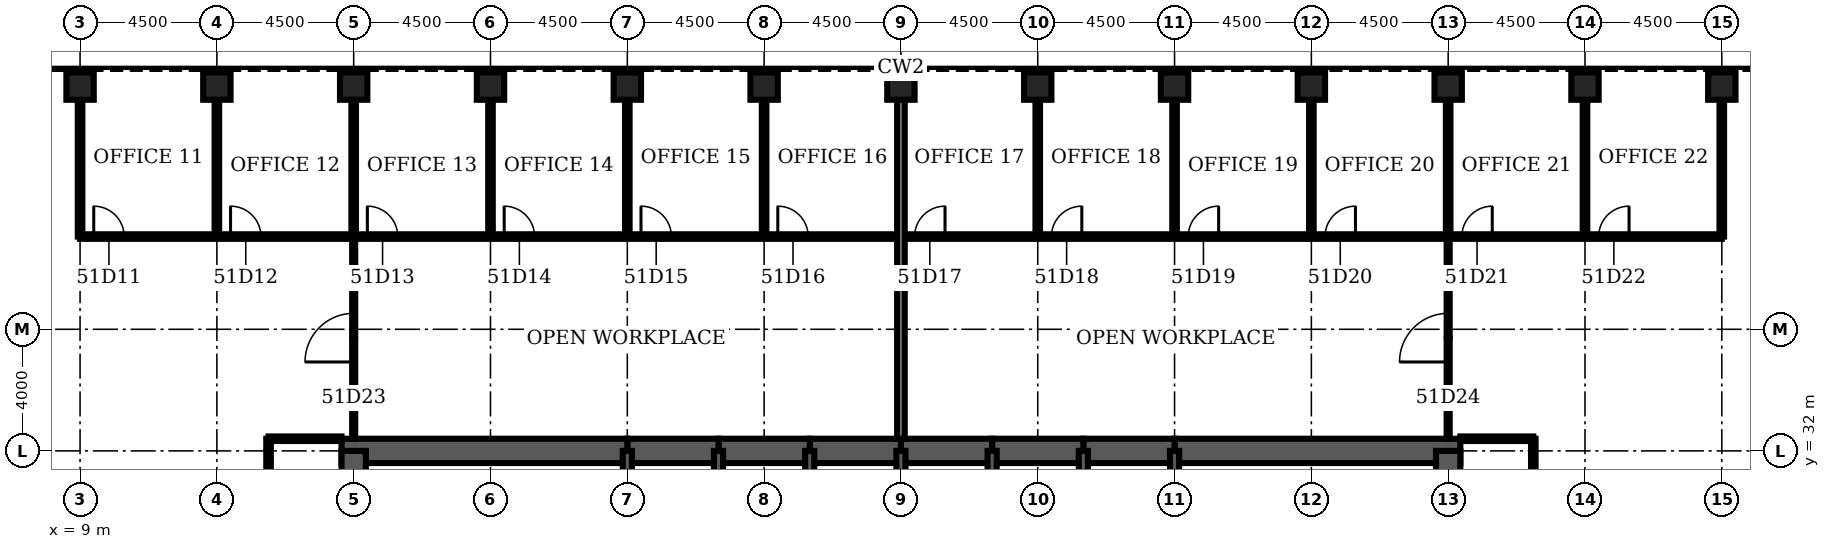
"""IFC4 building model, lengths in metres.
Left out: names, types, materials, properties, quantities, classifications, styles, units other than length and angle.
Written with IfcOpenShell. Run it as: python <this file> out.ifc"""

import sys

from ifc_helpers import new_model, si_unit, direction, frame, frame_2d, origin, origin_2d, place, context, subcontext, project, spatial, rectangle, hollow_rectangle, extrude, element, fill, save


model = new_model("IFC4")
c1 = context("Model", 3, precision=1e-05, world=origin(), true_north=direction((0.0, 1.0)))
c2 = subcontext(c1, "Body", "Model", "MODEL_VIEW")
j1 = project(units=[si_unit("LENGTHUNIT", "METRE"), si_unit("PLANEANGLEUNIT", "RADIAN")], contexts=[c1])
p1 = place(None, origin())
s1 = spatial("IfcSite", under=j1, at=p1, CompositionType="ELEMENT")
p2 = place(p1, origin())
s2 = spatial("IfcBuilding", under=s1, at=p2, CompositionType="ELEMENT")
p3 = place(p2, frame((0.0, 0.0, 227.8)))
s3 = spatial("IfcBuildingStorey", under=s2, at=p3, CompositionType="ELEMENT", Elevation=227.8)
for number, where, z_axis, x_axis in (
    (1, (63.0, 44.0, 0.0), (0.0, 0.0, 1.0), (0.0, 1.0, 0.0)),
    (2, (58.5, 44.0, 0.0), (0.0, 0.0, 1.0), (0.0, 1.0, 0.0)),
    (3, (54.0, 44.0, 0.0), (0.0, 0.0, 1.0), (0.0, 1.0, 0.0)),
    (4, (49.5, 44.0, 0.0), (0.0, 0.0, 1.0), (0.0, 1.0, 0.0)),
    (5, (45.0, 44.0, 0.0), (0.0, 0.0, 1.0), (0.0, 1.0, 0.0)),
    (6, (40.5, 44.0, 0.0), (0.0, 0.0, 1.0), (0.0, 1.0, 0.0)),
    (7, (36.0, 44.0, 0.0), (0.0, 0.0, 1.0), (0.0, 1.0, 0.0)),
    (8, (31.5, 44.0, 0.0), (0.0, 0.0, 1.0), (0.0, 1.0, 0.0)),
    (9, (27.0, 44.0, 0.0), (0.0, 0.0, 1.0), (0.0, 1.0, 0.0)),
    (10, (22.5, 44.0, 0.0), (0.0, 0.0, 1.0), (0.0, 1.0, 0.0)),
    (11, (18.0, 44.0, 0.0), (0.0, 0.0, 1.0), (0.0, 1.0, 0.0)),
    (12, (13.5, 44.0, 0.0), (0.0, 0.0, 1.0), (0.0, 1.0, 0.0)),
    (13, (9.0, 44.0, 0.0), (0.0, 0.0, 1.0), (0.0, 1.0, 0.0)),
):
    element("IfcColumn", number, at=place(p3, frame(where, z_axis=z_axis, x_axis=x_axis)), inside=s3, PredefinedType="COLUMN", context=c2, shape_type="SweptSolid", body=[
        extrude(hollow_rectangle(XDim=0.9, YDim=0.9, WallThickness=0.08, at=origin_2d()), origin(), (0.0, 0.0, 1.0), 4.2),
    ])
p4 = place(p3, frame((54.4, 32.0, 0.0), z_axis=(0.0, 0.0, 1.0), x_axis=(-1.0, 0.0, 0.0)))
e14 = element("IfcWall", 14, at=p4, inside=s3, PredefinedType="SHEAR", context=c2, shape_type="SweptSolid", body=[
    extrude(rectangle(XDim=9.4, YDim=0.8, at=frame_2d((4.7, 0.0))), origin(), (0.0, 0.0, 1.0), 4.2),
])
for number, where, z_axis, x_axis in (
    (15, (45.0, 32.0, 0.0), (0.0, 0.0, 1.0), (-1.0, 0.0, 0.0)),
    (16, (42.0, 32.0, 0.0), (0.0, 0.0, 1.0), (-1.0, 0.0, 0.0)),
    (17, (39.0, 32.0, 0.0), (0.0, 0.0, 1.0), (-1.0, 0.0, 0.0)),
    (18, (36.0, 32.0, 0.0), (0.0, 0.0, 1.0), (-1.0, 0.0, 0.0)),
    (19, (33.0, 32.0, 0.0), (0.0, 0.0, 1.0), (-1.0, 0.0, 0.0)),
    (20, (30.0, 32.0, 0.0), (0.0, 0.0, 1.0), (-1.0, 0.0, 0.0)),
):
    element("IfcWall", number, at=place(p3, frame(where, z_axis=z_axis, x_axis=x_axis)), inside=s3, PredefinedType="SHEAR", context=c2, shape_type="SweptSolid", body=[
        extrude(rectangle(XDim=3.0, YDim=0.8, at=frame_2d((1.5, 0.0))), origin(), (0.0, 0.0, 1.0), 4.2),
    ])
p5 = place(p3, frame((27.0, 32.0, 0.0), z_axis=(0.0, 0.0, 1.0), x_axis=(-1.0, 0.0, 0.0)))
e21 = element("IfcWall", 21, at=p5, inside=s3, PredefinedType="SHEAR", context=c2, shape_type="SweptSolid", body=[
    extrude(rectangle(XDim=9.4, YDim=0.8, at=frame_2d((4.7, 0.0))), origin(), (0.0, 0.0, 1.0), 4.2),
])
for number, where, z_axis, x_axis in (
    (22, (18.0, 32.0, 0.0), (0.0, 0.0, 1.0), (0.0, -1.0, 0.0)),
    (23, (54.0, 28.8, 0.0), (0.0, 0.0, 1.0), (0.0, 1.0, 0.0)),
):
    element("IfcWall", number, at=place(p3, frame(where, z_axis=z_axis, x_axis=x_axis)), inside=s3, PredefinedType="SHEAR", context=c2, shape_type="SweptSolid", body=[
        extrude(rectangle(XDim=3.2, YDim=0.8, at=frame_2d((1.6, 0.0))), origin(), (0.0, 0.0, 1.0), 4.2),
    ])
for number, where, z_axis, x_axis in (
    (24, (27.0, 28.8, 0.0), (0.0, 0.0, 1.0), (0.0, 1.0, 0.0)),
    (25, (30.0, 28.8, 0.0), (0.0, 0.0, 1.0), (0.0, 1.0, 0.0)),
    (26, (33.0, 28.8, 0.0), (0.0, 0.0, 1.0), (0.0, 1.0, 0.0)),
    (27, (36.0, 28.8, 0.0), (0.0, 0.0, 1.0), (0.0, 1.0, 0.0)),
    (28, (39.0, 28.8, 0.0), (0.0, 0.0, 1.0), (0.0, 1.0, 0.0)),
    (29, (42.0, 28.8, 0.0), (0.0, 0.0, 1.0), (0.0, 1.0, 0.0)),
    (30, (45.0, 28.8, 0.0), (0.0, 0.0, 1.0), (0.0, 1.0, 0.0)),
):
    element("IfcWall", number, at=place(p3, frame(where, z_axis=z_axis, x_axis=x_axis)), inside=s3, PredefinedType="SOLIDWALL", context=c2, shape_type="SweptSolid", body=[
        extrude(rectangle(XDim=3.2, YDim=0.3, at=frame_2d((1.6, 0.0))), origin(), (0.0, 0.0, 1.0), 4.2),
    ])
for number, where, z_axis, x_axis in (
    (31, (15.2, 32.4, 0.0), (0.0, 0.0, 1.0), (1.0, 0.0, 0.0)),
    (32, (54.4, 32.4, 0.0), (0.0, 0.0, 1.0), (1.0, 0.0, 0.0)),
):
    element("IfcWall", number, at=place(p3, frame(where, z_axis=z_axis, x_axis=x_axis)), inside=s3, PredefinedType="PARTITIONING", context=c2, shape_type="SweptSolid", body=[
        extrude(rectangle(XDim=2.4, YDim=0.15, at=frame_2d((1.2, 0.0))), origin(), (0.0, 0.0, 1.0), 3.0),
    ])
p6 = place(p3, frame((9.0, 39.05, 0.0), z_axis=(0.0, 0.0, 1.0), x_axis=(1.0, 0.0, 0.0)))
e33 = element("IfcWall", 33, at=p6, inside=s3, PredefinedType="PARTITIONING", context=c2, shape_type="SweptSolid", body=[
    extrude(rectangle(XDim=54.0, YDim=0.15, at=frame_2d((27.0, 0.0))), origin(), (0.0, 0.0, 1.0), 3.0),
])
p7 = place(p6, frame((0.45, 0.0, 0.0)))
e34 = element("IfcOpeningElement", 34, at=p7, cuts=e33, PredefinedType="OPENING", context=c2, shape_type="SweptSolid", body=[
    extrude(rectangle(XDim=1.0, YDim=2.1, at=frame_2d((0.5, 1.05))), frame((0.0, 0.085, 0.0), z_axis=(0.0, -1.0, 0.0), x_axis=(1.0, 0.0, 0.0)), (0.0, 0.0, 1.0), 0.17),
])
p8 = place(p6, frame((4.95, 0.0, 0.0)))
e35 = element("IfcOpeningElement", 35, at=p8, cuts=e33, PredefinedType="OPENING", context=c2, shape_type="SweptSolid", body=[
    extrude(rectangle(XDim=1.0, YDim=2.1, at=frame_2d((0.5, 1.05))), frame((0.0, 0.085, 0.0), z_axis=(0.0, -1.0, 0.0), x_axis=(1.0, 0.0, 0.0)), (0.0, 0.0, 1.0), 0.17),
])
p9 = place(p6, frame((9.45, 0.0, 0.0)))
e36 = element("IfcOpeningElement", 36, at=p9, cuts=e33, PredefinedType="OPENING", context=c2, shape_type="SweptSolid", body=[
    extrude(rectangle(XDim=1.0, YDim=2.1, at=frame_2d((0.5, 1.05))), frame((0.0, 0.085, 0.0), z_axis=(0.0, -1.0, 0.0), x_axis=(1.0, 0.0, 0.0)), (0.0, 0.0, 1.0), 0.17),
])
p10 = place(p6, frame((13.95, 0.0, 0.0)))
e37 = element("IfcOpeningElement", 37, at=p10, cuts=e33, PredefinedType="OPENING", context=c2, shape_type="SweptSolid", body=[
    extrude(rectangle(XDim=1.0, YDim=2.1, at=frame_2d((0.5, 1.05))), frame((0.0, 0.085, 0.0), z_axis=(0.0, -1.0, 0.0), x_axis=(1.0, 0.0, 0.0)), (0.0, 0.0, 1.0), 0.17),
])
p11 = place(p6, frame((18.45, 0.0, 0.0)))
e38 = element("IfcOpeningElement", 38, at=p11, cuts=e33, PredefinedType="OPENING", context=c2, shape_type="SweptSolid", body=[
    extrude(rectangle(XDim=1.0, YDim=2.1, at=frame_2d((0.5, 1.05))), frame((0.0, 0.085, 0.0), z_axis=(0.0, -1.0, 0.0), x_axis=(1.0, 0.0, 0.0)), (0.0, 0.0, 1.0), 0.17),
])
p12 = place(p6, frame((22.95, 0.0, 0.0)))
e39 = element("IfcOpeningElement", 39, at=p12, cuts=e33, PredefinedType="OPENING", context=c2, shape_type="SweptSolid", body=[
    extrude(rectangle(XDim=1.0, YDim=2.1, at=frame_2d((0.5, 1.05))), frame((0.0, 0.085, 0.0), z_axis=(0.0, -1.0, 0.0), x_axis=(1.0, 0.0, 0.0)), (0.0, 0.0, 1.0), 0.17),
])
p13 = place(p6, frame((27.45, 0.0, 0.0)))
e40 = element("IfcOpeningElement", 40, at=p13, cuts=e33, PredefinedType="OPENING", context=c2, shape_type="SweptSolid", body=[
    extrude(rectangle(XDim=1.0, YDim=2.1, at=frame_2d((0.5, 1.05))), frame((0.0, 0.085, 0.0), z_axis=(0.0, -1.0, 0.0), x_axis=(1.0, 0.0, 0.0)), (0.0, 0.0, 1.0), 0.17),
])
p14 = place(p6, frame((31.95, 0.0, 0.0)))
e41 = element("IfcOpeningElement", 41, at=p14, cuts=e33, PredefinedType="OPENING", context=c2, shape_type="SweptSolid", body=[
    extrude(rectangle(XDim=1.0, YDim=2.1, at=frame_2d((0.5, 1.05))), frame((0.0, 0.085, 0.0), z_axis=(0.0, -1.0, 0.0), x_axis=(1.0, 0.0, 0.0)), (0.0, 0.0, 1.0), 0.17),
])
p15 = place(p6, frame((36.45, 0.0, 0.0)))
e42 = element("IfcOpeningElement", 42, at=p15, cuts=e33, PredefinedType="OPENING", context=c2, shape_type="SweptSolid", body=[
    extrude(rectangle(XDim=1.0, YDim=2.1, at=frame_2d((0.5, 1.05))), frame((0.0, 0.085, 0.0), z_axis=(0.0, -1.0, 0.0), x_axis=(1.0, 0.0, 0.0)), (0.0, 0.0, 1.0), 0.17),
])
p16 = place(p6, frame((40.95, 0.0, 0.0)))
e43 = element("IfcOpeningElement", 43, at=p16, cuts=e33, PredefinedType="OPENING", context=c2, shape_type="SweptSolid", body=[
    extrude(rectangle(XDim=1.0, YDim=2.1, at=frame_2d((0.5, 1.05))), frame((0.0, 0.085, 0.0), z_axis=(0.0, -1.0, 0.0), x_axis=(1.0, 0.0, 0.0)), (0.0, 0.0, 1.0), 0.17),
])
p17 = place(p6, frame((45.45, 0.0, 0.0)))
e44 = element("IfcOpeningElement", 44, at=p17, cuts=e33, PredefinedType="OPENING", context=c2, shape_type="SweptSolid", body=[
    extrude(rectangle(XDim=1.0, YDim=2.1, at=frame_2d((0.5, 1.05))), frame((0.0, 0.085, 0.0), z_axis=(0.0, -1.0, 0.0), x_axis=(1.0, 0.0, 0.0)), (0.0, 0.0, 1.0), 0.17),
])
p18 = place(p6, frame((49.95, 0.0, 0.0)))
e45 = element("IfcOpeningElement", 45, at=p18, cuts=e33, PredefinedType="OPENING", context=c2, shape_type="SweptSolid", body=[
    extrude(rectangle(XDim=1.0, YDim=2.1, at=frame_2d((0.5, 1.05))), frame((0.0, 0.085, 0.0), z_axis=(0.0, -1.0, 0.0), x_axis=(1.0, 0.0, 0.0)), (0.0, 0.0, 1.0), 0.17),
])
for number, where, z_axis, x_axis in (
    (46, (9.0, 39.05, 0.0), (0.0, 0.0, 1.0), (0.0, 1.0, 0.0)),
    (47, (13.5, 39.05, 0.0), (0.0, 0.0, 1.0), (0.0, 1.0, 0.0)),
):
    element("IfcWall", number, at=place(p3, frame(where, z_axis=z_axis, x_axis=x_axis)), inside=s3, PredefinedType="PARTITIONING", context=c2, shape_type="SweptSolid", body=[
        extrude(rectangle(XDim=4.5, YDim=0.15, at=frame_2d((2.25, 0.0))), origin(), (0.0, 0.0, 1.0), 3.0),
    ])
p19 = place(p3, frame((15.2, 13.8, 0.0), z_axis=(0.0, 0.0, 1.0), x_axis=(0.0, 1.0, 0.0)))
e48 = element("IfcWall", 48, at=p19, inside=s3, PredefinedType="PARTITIONING", context=c2, shape_type="SweptSolid", body=[
    extrude(rectangle(XDim=18.6, YDim=0.15, at=frame_2d((9.3, 0.0))), origin(), (0.0, 0.0, 1.0), 3.0),
])
p20 = place(p19, frame((9.6, 0.0, 0.0)))
e49 = element("IfcOpeningElement", 49, at=p20, cuts=e48, PredefinedType="OPENING", context=c2, shape_type="SweptSolid", body=[
    extrude(rectangle(XDim=1.2, YDim=2.1, at=frame_2d((0.6, 1.05))), frame((0.0, 0.085, 0.0), z_axis=(0.0, -1.0, 0.0), x_axis=(1.0, 0.0, 0.0)), (0.0, 0.0, 1.0), 0.17),
])
p21 = place(p3, frame((18.0, 32.4, 0.0), z_axis=(0.0, 0.0, 1.0), x_axis=(0.0, 1.0, 0.0)))
e50 = element("IfcWall", 50, at=p21, inside=s3, PredefinedType="PARTITIONING", context=c2, shape_type="SweptSolid", body=[
    extrude(rectangle(XDim=6.65, YDim=0.1, at=frame_2d((3.325, 0.0))), origin(), (0.0, 0.0, 1.0), 3.0),
])
p22 = place(p21, frame((2.525, 0.0, 0.0)))
e51 = element("IfcOpeningElement", 51, at=p22, cuts=e50, PredefinedType="OPENING", context=c2, shape_type="SweptSolid", body=[
    extrude(rectangle(XDim=1.6, YDim=2.1, at=frame_2d((0.8, 1.05))), frame((0.0, 0.06, 0.0), z_axis=(0.0, -1.0, 0.0), x_axis=(1.0, 0.0, 0.0)), (0.0, 0.0, 1.0), 0.12),
])
for number, where, z_axis, x_axis in (
    (52, (18.0, 39.05, 0.0), (0.0, 0.0, 1.0), (0.0, 1.0, 0.0)),
    (53, (22.5, 39.05, 0.0), (0.0, 0.0, 1.0), (0.0, 1.0, 0.0)),
    (54, (27.0, 39.05, 0.0), (0.0, 0.0, 1.0), (0.0, 1.0, 0.0)),
    (55, (31.5, 39.05, 0.0), (0.0, 0.0, 1.0), (0.0, 1.0, 0.0)),
):
    element("IfcWall", number, at=place(p3, frame(where, z_axis=z_axis, x_axis=x_axis)), inside=s3, PredefinedType="PARTITIONING", context=c2, shape_type="SweptSolid", body=[
        extrude(rectangle(XDim=4.5, YDim=0.15, at=frame_2d((2.25, 0.0))), origin(), (0.0, 0.0, 1.0), 3.0),
    ])
p23 = place(p3, frame((36.0, 32.4, 0.0), z_axis=(0.0, 0.0, 1.0), x_axis=(0.0, 1.0, 0.0)))
e56 = element("IfcWall", 56, at=p23, inside=s3, PredefinedType="PARTITIONING", context=c2, shape_type="SweptSolid", body=[
    extrude(rectangle(XDim=11.15, YDim=0.25, at=frame_2d((5.575, 0.0))), origin(), (0.0, 0.0, 1.0), 3.0),
])
for number, where, z_axis, x_axis in (
    (57, (40.5, 39.05, 0.0), (0.0, 0.0, 1.0), (0.0, 1.0, 0.0)),
    (58, (45.0, 39.05, 0.0), (0.0, 0.0, 1.0), (0.0, 1.0, 0.0)),
    (59, (49.5, 39.05, 0.0), (0.0, 0.0, 1.0), (0.0, 1.0, 0.0)),
):
    element("IfcWall", number, at=place(p3, frame(where, z_axis=z_axis, x_axis=x_axis)), inside=s3, PredefinedType="PARTITIONING", context=c2, shape_type="SweptSolid", body=[
        extrude(rectangle(XDim=4.5, YDim=0.15, at=frame_2d((2.25, 0.0))), origin(), (0.0, 0.0, 1.0), 3.0),
    ])
p24 = place(p3, frame((54.0, 32.4, 0.0), z_axis=(0.0, 0.0, 1.0), x_axis=(0.0, 1.0, 0.0)))
e60 = element("IfcWall", 60, at=p24, inside=s3, PredefinedType="PARTITIONING", context=c2, shape_type="SweptSolid", body=[
    extrude(rectangle(XDim=6.65, YDim=0.1, at=frame_2d((3.325, 0.0))), origin(), (0.0, 0.0, 1.0), 3.0),
])
p25 = place(p24, frame((2.525, 0.0, 0.0)))
e61 = element("IfcOpeningElement", 61, at=p25, cuts=e60, PredefinedType="OPENING", context=c2, shape_type="SweptSolid", body=[
    extrude(rectangle(XDim=1.6, YDim=2.1, at=frame_2d((0.8, 1.05))), frame((0.0, 0.06, 0.0), z_axis=(0.0, -1.0, 0.0), x_axis=(1.0, 0.0, 0.0)), (0.0, 0.0, 1.0), 0.12),
])
p26 = place(p3, frame((54.0, 39.05, 0.0), z_axis=(0.0, 0.0, 1.0), x_axis=(0.0, 1.0, 0.0)))
e62 = element("IfcWall", 62, at=p26, inside=s3, PredefinedType="PARTITIONING", context=c2, shape_type="SweptSolid", body=[
    extrude(rectangle(XDim=4.5, YDim=0.15, at=frame_2d((2.25, 0.0))), origin(), (0.0, 0.0, 1.0), 3.0),
])
p27 = place(p3, frame((56.8, 13.8, 0.0), z_axis=(0.0, 0.0, 1.0), x_axis=(0.0, 1.0, 0.0)))
e63 = element("IfcWall", 63, at=p27, inside=s3, PredefinedType="PARTITIONING", context=c2, shape_type="SweptSolid", body=[
    extrude(rectangle(XDim=18.6, YDim=0.15, at=frame_2d((9.3, 0.0))), origin(), (0.0, 0.0, 1.0), 3.0),
])
p28 = place(p27, frame((9.6, 0.0, 0.0)))
e64 = element("IfcOpeningElement", 64, at=p28, cuts=e63, PredefinedType="OPENING", context=c2, shape_type="SweptSolid", body=[
    extrude(rectangle(XDim=1.2, YDim=2.1, at=frame_2d((0.6, 1.05))), frame((0.0, 0.085, 0.0), z_axis=(0.0, -1.0, 0.0), x_axis=(1.0, 0.0, 0.0)), (0.0, 0.0, 1.0), 0.17),
])
for number, where, z_axis, x_axis in (
    (65, (58.5, 39.05, 0.0), (0.0, 0.0, 1.0), (0.0, 1.0, 0.0)),
    (66, (63.0, 39.05, 0.0), (0.0, 0.0, 1.0), (0.0, 1.0, 0.0)),
):
    element("IfcWall", number, at=place(p3, frame(where, z_axis=z_axis, x_axis=x_axis)), inside=s3, PredefinedType="PARTITIONING", context=c2, shape_type="SweptSolid", body=[
        extrude(rectangle(XDim=4.5, YDim=0.15, at=frame_2d((2.25, 0.0))), origin(), (0.0, 0.0, 1.0), 3.0),
    ])
p29 = place(p7, origin())
e67 = element("IfcDoor", 67, at=p29, inside=s3, OperationType="SINGLE_SWING_LEFT", PredefinedType="DOOR", context=c2, shape_type="SweptSolid", body=[
    extrude(rectangle(XDim=1.0, YDim=2.1, at=frame_2d((0.5, 1.05))), frame((0.0, 0.025, 0.0), z_axis=(0.0, -1.0, 0.0), x_axis=(1.0, 0.0, 0.0)), (0.0, 0.0, 1.0), 0.05),
])
fill(e34, e67)
p30 = place(p8, origin())
e68 = element("IfcDoor", 68, at=p30, inside=s3, OperationType="SINGLE_SWING_LEFT", PredefinedType="DOOR", context=c2, shape_type="SweptSolid", body=[
    extrude(rectangle(XDim=1.0, YDim=2.1, at=frame_2d((0.5, 1.05))), frame((0.0, 0.025, 0.0), z_axis=(0.0, -1.0, 0.0), x_axis=(1.0, 0.0, 0.0)), (0.0, 0.0, 1.0), 0.05),
])
fill(e35, e68)
p31 = place(p9, origin())
e69 = element("IfcDoor", 69, at=p31, inside=s3, OperationType="SINGLE_SWING_LEFT", PredefinedType="DOOR", context=c2, shape_type="SweptSolid", body=[
    extrude(rectangle(XDim=1.0, YDim=2.1, at=frame_2d((0.5, 1.05))), frame((0.0, 0.025, 0.0), z_axis=(0.0, -1.0, 0.0), x_axis=(1.0, 0.0, 0.0)), (0.0, 0.0, 1.0), 0.05),
])
fill(e36, e69)
p32 = place(p10, origin())
e70 = element("IfcDoor", 70, at=p32, inside=s3, OperationType="SINGLE_SWING_LEFT", PredefinedType="DOOR", context=c2, shape_type="SweptSolid", body=[
    extrude(rectangle(XDim=1.0, YDim=2.1, at=frame_2d((0.5, 1.05))), frame((0.0, 0.025, 0.0), z_axis=(0.0, -1.0, 0.0), x_axis=(1.0, 0.0, 0.0)), (0.0, 0.0, 1.0), 0.05),
])
fill(e37, e70)
p33 = place(p11, origin())
e71 = element("IfcDoor", 71, at=p33, inside=s3, OperationType="SINGLE_SWING_LEFT", PredefinedType="DOOR", context=c2, shape_type="SweptSolid", body=[
    extrude(rectangle(XDim=1.0, YDim=2.1, at=frame_2d((0.5, 1.05))), frame((0.0, 0.025, 0.0), z_axis=(0.0, -1.0, 0.0), x_axis=(1.0, 0.0, 0.0)), (0.0, 0.0, 1.0), 0.05),
])
fill(e38, e71)
p34 = place(p12, origin())
e72 = element("IfcDoor", 72, at=p34, inside=s3, OperationType="SINGLE_SWING_LEFT", PredefinedType="DOOR", context=c2, shape_type="SweptSolid", body=[
    extrude(rectangle(XDim=1.0, YDim=2.1, at=frame_2d((0.5, 1.05))), frame((0.0, 0.025, 0.0), z_axis=(0.0, -1.0, 0.0), x_axis=(1.0, 0.0, 0.0)), (0.0, 0.0, 1.0), 0.05),
])
fill(e39, e72)
p35 = place(p13, origin())
e73 = element("IfcDoor", 73, at=p35, inside=s3, OperationType="SINGLE_SWING_RIGHT", PredefinedType="DOOR", context=c2, shape_type="SweptSolid", body=[
    extrude(rectangle(XDim=1.0, YDim=2.1, at=frame_2d((0.5, 1.05))), frame((0.0, 0.025, 0.0), z_axis=(0.0, -1.0, 0.0), x_axis=(1.0, 0.0, 0.0)), (0.0, 0.0, 1.0), 0.05),
])
fill(e40, e73)
p36 = place(p14, origin())
e74 = element("IfcDoor", 74, at=p36, inside=s3, OperationType="SINGLE_SWING_RIGHT", PredefinedType="DOOR", context=c2, shape_type="SweptSolid", body=[
    extrude(rectangle(XDim=1.0, YDim=2.1, at=frame_2d((0.5, 1.05))), frame((0.0, 0.025, 0.0), z_axis=(0.0, -1.0, 0.0), x_axis=(1.0, 0.0, 0.0)), (0.0, 0.0, 1.0), 0.05),
])
fill(e41, e74)
p37 = place(p15, origin())
e75 = element("IfcDoor", 75, at=p37, inside=s3, OperationType="SINGLE_SWING_RIGHT", PredefinedType="DOOR", context=c2, shape_type="SweptSolid", body=[
    extrude(rectangle(XDim=1.0, YDim=2.1, at=frame_2d((0.5, 1.05))), frame((0.0, 0.025, 0.0), z_axis=(0.0, -1.0, 0.0), x_axis=(1.0, 0.0, 0.0)), (0.0, 0.0, 1.0), 0.05),
])
fill(e42, e75)
p38 = place(p16, origin())
e76 = element("IfcDoor", 76, at=p38, inside=s3, OperationType="SINGLE_SWING_RIGHT", PredefinedType="DOOR", context=c2, shape_type="SweptSolid", body=[
    extrude(rectangle(XDim=1.0, YDim=2.1, at=frame_2d((0.5, 1.05))), frame((0.0, 0.025, 0.0), z_axis=(0.0, -1.0, 0.0), x_axis=(1.0, 0.0, 0.0)), (0.0, 0.0, 1.0), 0.05),
])
fill(e43, e76)
p39 = place(p17, origin())
e77 = element("IfcDoor", 77, at=p39, inside=s3, OperationType="SINGLE_SWING_RIGHT", PredefinedType="DOOR", context=c2, shape_type="SweptSolid", body=[
    extrude(rectangle(XDim=1.0, YDim=2.1, at=frame_2d((0.5, 1.05))), frame((0.0, 0.025, 0.0), z_axis=(0.0, -1.0, 0.0), x_axis=(1.0, 0.0, 0.0)), (0.0, 0.0, 1.0), 0.05),
])
fill(e44, e77)
p40 = place(p18, origin())
e78 = element("IfcDoor", 78, at=p40, inside=s3, OperationType="SINGLE_SWING_RIGHT", PredefinedType="DOOR", context=c2, shape_type="SweptSolid", body=[
    extrude(rectangle(XDim=1.0, YDim=2.1, at=frame_2d((0.5, 1.05))), frame((0.0, 0.025, 0.0), z_axis=(0.0, -1.0, 0.0), x_axis=(1.0, 0.0, 0.0)), (0.0, 0.0, 1.0), 0.05),
])
fill(e45, e78)
p41 = place(p22, origin())
e79 = element("IfcDoor", 79, at=p41, inside=s3, OperationType="SINGLE_SWING_LEFT", PredefinedType="DOOR", context=c2, shape_type="SweptSolid", body=[
    extrude(rectangle(XDim=1.6, YDim=2.1, at=frame_2d((0.8, 1.05))), frame((0.0, 0.025, 0.0), z_axis=(0.0, -1.0, 0.0), x_axis=(1.0, 0.0, 0.0)), (0.0, 0.0, 1.0), 0.05),
])
fill(e51, e79)
p42 = place(p25, origin())
e80 = element("IfcDoor", 80, at=p42, inside=s3, OperationType="SINGLE_SWING_LEFT", PredefinedType="DOOR", context=c2, shape_type="SweptSolid", body=[
    extrude(rectangle(XDim=1.6, YDim=2.1, at=frame_2d((0.8, 1.05))), frame((0.0, 0.025, 0.0), z_axis=(0.0, -1.0, 0.0), x_axis=(1.0, 0.0, 0.0)), (0.0, 0.0, 1.0), 0.05),
])
fill(e61, e80)
save(model, sys.argv[1])
